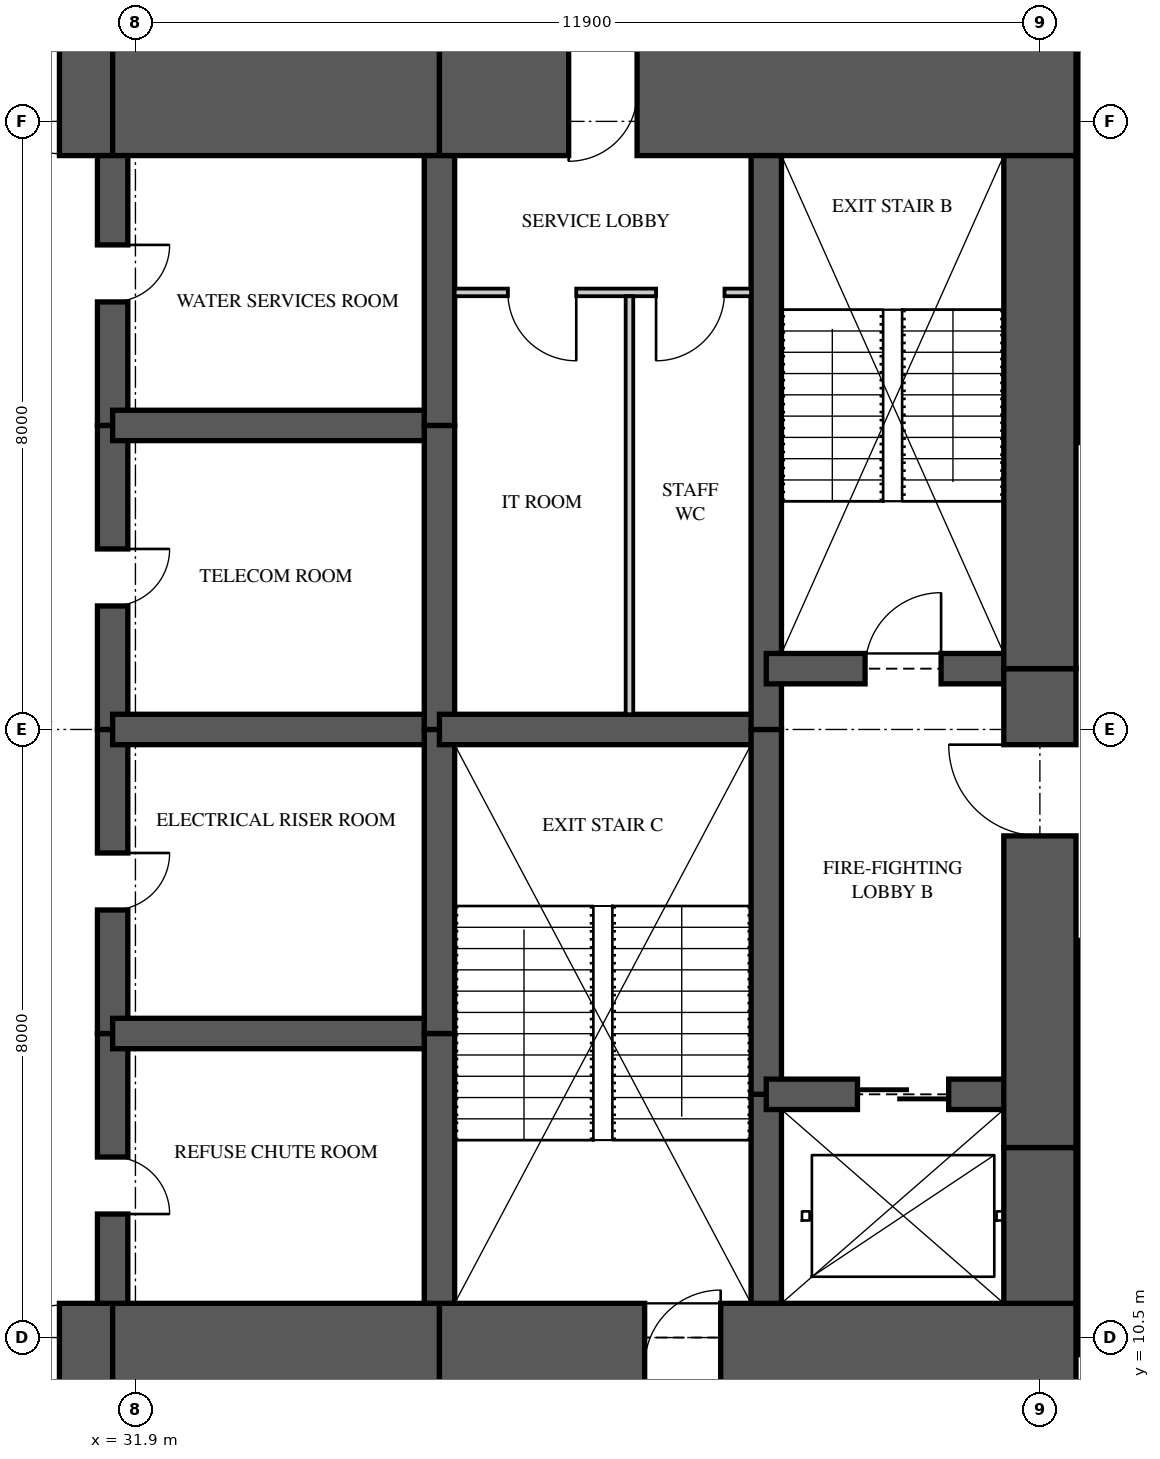
"""IFC4 building model, lengths in metres.
Left out: names, types, materials, properties, quantities, classifications, styles, units other than length and angle.
Written with IfcOpenShell. Run it as: python <this file> out.ifc"""

import sys

from ifc_helpers import new_model, si_unit, direction, frame, frame_2d, origin, place, context, subcontext, project, spatial, rectangle, extrude, element, fill, save


model = new_model("IFC4")
c1 = context("Model", 3, precision=1e-05, world=origin(), true_north=direction((0.0, 1.0)))
c2 = subcontext(c1, "Body", "Model", "MODEL_VIEW")
j1 = project(units=[si_unit("LENGTHUNIT", "METRE"), si_unit("PLANEANGLEUNIT", "RADIAN")], contexts=[c1])
p1 = place(None, origin())
s1 = spatial("IfcSite", under=j1, at=p1, CompositionType="ELEMENT")
p2 = place(p1, origin())
s2 = spatial("IfcBuilding", under=s1, at=p2, CompositionType="ELEMENT")
p3 = place(p2, frame((0.0, 0.0, 34.4)))
s3 = spatial("IfcBuildingStorey", under=s2, at=p3, CompositionType="ELEMENT", Elevation=34.4)
p4 = place(p3, frame((26.0, 10.125, 0.0), z_axis=(0.0, 0.0, 1.0), x_axis=(1.0, 0.0, 0.0)))
e1 = element("IfcWall", 1, at=p4, inside=s3, PredefinedType="SHEAR", context=c2, shape_type="SweptSolid", body=[
    extrude(rectangle(XDim=5.6, YDim=1.65, at=frame_2d((2.8, 0.0))), origin(), (0.0, 0.0, 1.0), 3.35),
])
p5 = place(p4, frame((3.3, 0.0, 0.0)))
e2 = element("IfcOpeningElement", 2, at=p5, cuts=e1, PredefinedType="OPENING", context=c2, shape_type="SweptSolid", body=[
    extrude(rectangle(XDim=1.6, YDim=2.1, at=frame_2d((0.8, 1.05))), frame((0.0, 0.835, 0.0), z_axis=(0.0, -1.0, 0.0), x_axis=(1.0, 0.0, 0.0)), (0.0, 0.0, 1.0), 1.67),
])
p6 = place(p3, frame((31.6, 10.125, 0.0), z_axis=(0.0, 0.0, 1.0), x_axis=(1.0, 0.0, 0.0)))
e3 = element("IfcWall", 3, at=p6, inside=s3, PredefinedType="SHEAR", context=c2, shape_type="SweptSolid", body=[
    extrude(rectangle(XDim=4.3, YDim=1.65, at=frame_2d((2.15, 0.0))), origin(), (0.0, 0.0, 1.0), 3.35),
])
p7 = place(p3, frame((35.9, 10.125, 0.0), z_axis=(0.0, 0.0, 1.0), x_axis=(1.0, 0.0, 0.0)))
e4 = element("IfcWall", 4, at=p7, inside=s3, PredefinedType="SHEAR", context=c2, shape_type="SweptSolid", body=[
    extrude(rectangle(XDim=8.375, YDim=1.65, at=frame_2d((4.188, 0.0))), origin(), (0.0, 0.0, 1.0), 3.35),
])
p8 = place(p7, frame((2.7, 0.0, 0.0)))
e5 = element("IfcOpeningElement", 5, at=p8, cuts=e4, PredefinedType="OPENING", context=c2, shape_type="SweptSolid", body=[
    extrude(rectangle(XDim=1.0, YDim=2.1, at=frame_2d((0.5, 1.05))), frame((0.0, 0.835, 0.0), z_axis=(0.0, -1.0, 0.0), x_axis=(1.0, 0.0, 0.0)), (0.0, 0.0, 1.0), 1.67),
])
p9 = place(p3, frame((44.275, 26.875, 0.0), z_axis=(0.0, 0.0, 1.0), x_axis=(-1.0, 0.0, 0.0)))
e6 = element("IfcWall", 6, at=p9, inside=s3, PredefinedType="SHEAR", context=c2, shape_type="SweptSolid", body=[
    extrude(rectangle(XDim=8.375, YDim=1.65, at=frame_2d((4.188, 0.0))), origin(), (0.0, 0.0, 1.0), 3.35),
])
p10 = place(p9, frame((5.775, 0.0, 0.0)))
e7 = element("IfcOpeningElement", 7, at=p10, cuts=e6, PredefinedType="OPENING", context=c2, shape_type="SweptSolid", body=[
    extrude(rectangle(XDim=0.9, YDim=2.1, at=frame_2d((0.45, 1.05))), frame((0.0, 0.835, 0.0), z_axis=(0.0, -1.0, 0.0), x_axis=(1.0, 0.0, 0.0)), (0.0, 0.0, 1.0), 1.67),
])
p11 = place(p3, frame((35.9, 26.875, 0.0), z_axis=(0.0, 0.0, 1.0), x_axis=(-1.0, 0.0, 0.0)))
e8 = element("IfcWall", 8, at=p11, inside=s3, PredefinedType="SHEAR", context=c2, shape_type="SweptSolid", body=[
    extrude(rectangle(XDim=4.3, YDim=1.65, at=frame_2d((2.15, 0.0))), origin(), (0.0, 0.0, 1.0), 3.35),
])
p12 = place(p3, frame((31.6, 26.875, 0.0), z_axis=(0.0, 0.0, 1.0), x_axis=(-1.0, 0.0, 0.0)))
e9 = element("IfcWall", 9, at=p12, inside=s3, PredefinedType="SHEAR", context=c2, shape_type="SweptSolid", body=[
    extrude(rectangle(XDim=5.6, YDim=1.65, at=frame_2d((2.8, 0.0))), origin(), (0.0, 0.0, 1.0), 3.35),
])
p13 = place(p12, frame((0.7, 0.0, 0.0)))
e10 = element("IfcOpeningElement", 10, at=p13, cuts=e9, PredefinedType="OPENING", context=c2, shape_type="SweptSolid", body=[
    extrude(rectangle(XDim=1.6, YDim=2.1, at=frame_2d((0.8, 1.05))), frame((0.0, 0.835, 0.0), z_axis=(0.0, -1.0, 0.0), x_axis=(1.0, 0.0, 0.0)), (0.0, 0.0, 1.0), 1.67),
])
p14 = place(p3, frame((43.8, 10.95, 0.0), z_axis=(0.0, 0.0, 1.0), x_axis=(0.0, 1.0, 0.0)))
e11 = element("IfcWall", 11, at=p14, inside=s3, PredefinedType="SHEAR", context=c2, shape_type="SweptSolid", body=[
    extrude(rectangle(XDim=2.05, YDim=0.95, at=frame_2d((1.025, 0.0))), origin(), (0.0, 0.0, 1.0), 3.35),
])
p15 = place(p3, frame((43.8, 13.0, 0.0), z_axis=(0.0, 0.0, 1.0), x_axis=(0.0, 1.0, 0.0)))
e12 = element("IfcWall", 12, at=p15, inside=s3, PredefinedType="SHEAR", context=c2, shape_type="SweptSolid", body=[
    extrude(rectangle(XDim=6.3, YDim=0.95, at=frame_2d((3.15, 0.0))), origin(), (0.0, 0.0, 1.0), 3.35),
])
p16 = place(p15, frame((4.1, 0.0, 0.0)))
e13 = element("IfcOpeningElement", 13, at=p16, cuts=e12, PredefinedType="OPENING", context=c2, shape_type="SweptSolid", body=[
    extrude(rectangle(XDim=1.2, YDim=2.2, at=frame_2d((0.6, 1.1))), frame((0.0, 0.485, 0.0), z_axis=(0.0, -1.0, 0.0), x_axis=(1.0, 0.0, 0.0)), (0.0, 0.0, 1.0), 0.97),
])
p17 = place(p3, frame((43.8, 19.3, 0.0), z_axis=(0.0, 0.0, 1.0), x_axis=(0.0, 1.0, 0.0)))
e14 = element("IfcWall", 14, at=p17, inside=s3, PredefinedType="SHEAR", context=c2, shape_type="SweptSolid", body=[
    extrude(rectangle(XDim=6.75, YDim=0.95, at=frame_2d((3.375, 0.0))), origin(), (0.0, 0.0, 1.0), 3.35),
])
p18 = place(p3, frame((31.6, 10.95, 0.0), z_axis=(0.0, 0.0, 1.0), x_axis=(0.0, 1.0, 0.0)))
e15 = element("IfcWall", 15, at=p18, inside=s3, PredefinedType="SHEAR", context=c2, shape_type="SweptSolid", body=[
    extrude(rectangle(XDim=3.55, YDim=0.4, at=frame_2d((1.775, 0.0))), origin(), (0.0, 0.0, 1.0), 3.35),
])
p19 = place(p18, frame((1.175, 0.0, 0.0)))
e16 = element("IfcOpeningElement", 16, at=p19, cuts=e15, PredefinedType="OPENING", context=c2, shape_type="SweptSolid", body=[
    extrude(rectangle(XDim=0.75, YDim=2.1, at=frame_2d((0.375, 1.05))), frame((0.0, 0.21, 0.0), z_axis=(0.0, -1.0, 0.0), x_axis=(1.0, 0.0, 0.0)), (0.0, 0.0, 1.0), 0.42),
])
p20 = place(p3, frame((31.6, 14.5, 0.0), z_axis=(0.0, 0.0, 1.0), x_axis=(0.0, 1.0, 0.0)))
e17 = element("IfcWall", 17, at=p20, inside=s3, PredefinedType="SHEAR", context=c2, shape_type="SweptSolid", body=[
    extrude(rectangle(XDim=4.0, YDim=0.4, at=frame_2d((2.0, 0.0))), origin(), (0.0, 0.0, 1.0), 3.35),
])
p21 = place(p20, frame((1.625, 0.0, 0.0)))
e18 = element("IfcOpeningElement", 18, at=p21, cuts=e17, PredefinedType="OPENING", context=c2, shape_type="SweptSolid", body=[
    extrude(rectangle(XDim=0.75, YDim=2.1, at=frame_2d((0.375, 1.05))), frame((0.0, 0.21, 0.0), z_axis=(0.0, -1.0, 0.0), x_axis=(1.0, 0.0, 0.0)), (0.0, 0.0, 1.0), 0.42),
])
p22 = place(p3, frame((31.6, 18.5, 0.0), z_axis=(0.0, 0.0, 1.0), x_axis=(0.0, 1.0, 0.0)))
e19 = element("IfcWall", 19, at=p22, inside=s3, PredefinedType="SHEAR", context=c2, shape_type="SweptSolid", body=[
    extrude(rectangle(XDim=4.0, YDim=0.4, at=frame_2d((2.0, 0.0))), origin(), (0.0, 0.0, 1.0), 3.35),
])
p23 = place(p22, frame((1.625, 0.0, 0.0)))
e20 = element("IfcOpeningElement", 20, at=p23, cuts=e19, PredefinedType="OPENING", context=c2, shape_type="SweptSolid", body=[
    extrude(rectangle(XDim=0.75, YDim=2.1, at=frame_2d((0.375, 1.05))), frame((0.0, 0.21, 0.0), z_axis=(0.0, -1.0, 0.0), x_axis=(1.0, 0.0, 0.0)), (0.0, 0.0, 1.0), 0.42),
])
p24 = place(p3, frame((31.6, 22.5, 0.0), z_axis=(0.0, 0.0, 1.0), x_axis=(0.0, 1.0, 0.0)))
e21 = element("IfcWall", 21, at=p24, inside=s3, PredefinedType="SHEAR", context=c2, shape_type="SweptSolid", body=[
    extrude(rectangle(XDim=3.55, YDim=0.4, at=frame_2d((1.775, 0.0))), origin(), (0.0, 0.0, 1.0), 3.35),
])
p25 = place(p24, frame((1.625, 0.0, 0.0)))
e22 = element("IfcOpeningElement", 22, at=p25, cuts=e21, PredefinedType="OPENING", context=c2, shape_type="SweptSolid", body=[
    extrude(rectangle(XDim=0.75, YDim=2.1, at=frame_2d((0.375, 1.05))), frame((0.0, 0.21, 0.0), z_axis=(0.0, -1.0, 0.0), x_axis=(1.0, 0.0, 0.0)), (0.0, 0.0, 1.0), 0.42),
])
p26 = place(p3, frame((35.9, 10.95, 0.0), z_axis=(0.0, 0.0, 1.0), x_axis=(0.0, 1.0, 0.0)))
e23 = element("IfcWall", 23, at=p26, inside=s3, PredefinedType="SHEAR", context=c2, shape_type="SweptSolid", body=[
    extrude(rectangle(XDim=3.55, YDim=0.4, at=frame_2d((1.775, 0.0))), origin(), (0.0, 0.0, 1.0), 3.35),
])
for number, where, z_axis, x_axis in (
    (24, (35.9, 14.5, 0.0), (0.0, 0.0, 1.0), (0.0, 1.0, 0.0)),
    (25, (35.9, 18.5, 0.0), (0.0, 0.0, 1.0), (0.0, 1.0, 0.0)),
):
    element("IfcWall", number, at=place(p3, frame(where, z_axis=z_axis, x_axis=x_axis)), inside=s3, PredefinedType="SHEAR", context=c2, shape_type="SweptSolid", body=[
        extrude(rectangle(XDim=4.0, YDim=0.4, at=frame_2d((2.0, 0.0))), origin(), (0.0, 0.0, 1.0), 3.35),
    ])
p27 = place(p3, frame((35.9, 22.5, 0.0), z_axis=(0.0, 0.0, 1.0), x_axis=(0.0, 1.0, 0.0)))
e26 = element("IfcWall", 26, at=p27, inside=s3, PredefinedType="SHEAR", context=c2, shape_type="SweptSolid", body=[
    extrude(rectangle(XDim=3.55, YDim=0.4, at=frame_2d((1.775, 0.0))), origin(), (0.0, 0.0, 1.0), 3.35),
])
p28 = place(p3, frame((40.2, 10.95, 0.0), z_axis=(0.0, 0.0, 1.0), x_axis=(0.0, 1.0, 0.0)))
e27 = element("IfcWall", 27, at=p28, inside=s3, PredefinedType="SHEAR", context=c2, shape_type="SweptSolid", body=[
    extrude(rectangle(XDim=2.75, YDim=0.4, at=frame_2d((1.375, 0.0))), origin(), (0.0, 0.0, 1.0), 3.35),
])
p29 = place(p3, frame((40.2, 13.7, 0.0), z_axis=(0.0, 0.0, 1.0), x_axis=(0.0, 1.0, 0.0)))
e28 = element("IfcWall", 28, at=p29, inside=s3, PredefinedType="SHEAR", context=c2, shape_type="SweptSolid", body=[
    extrude(rectangle(XDim=4.8, YDim=0.4, at=frame_2d((2.4, 0.0))), origin(), (0.0, 0.0, 1.0), 3.35),
])
p30 = place(p3, frame((40.2, 18.5, 0.0), z_axis=(0.0, 0.0, 1.0), x_axis=(0.0, 1.0, 0.0)))
e29 = element("IfcWall", 29, at=p30, inside=s3, PredefinedType="SHEAR", context=c2, shape_type="SweptSolid", body=[
    extrude(rectangle(XDim=7.55, YDim=0.4, at=frame_2d((3.775, 0.0))), origin(), (0.0, 0.0, 1.0), 3.35),
])
for number, where, z_axis, x_axis in (
    (30, (31.6, 14.5, 0.0), (0.0, 0.0, 1.0), (1.0, 0.0, 0.0)),
    (31, (31.6, 18.5, 0.0), (0.0, 0.0, 1.0), (1.0, 0.0, 0.0)),
    (32, (31.6, 22.5, 0.0), (0.0, 0.0, 1.0), (1.0, 0.0, 0.0)),
):
    element("IfcWall", number, at=place(p3, frame(where, z_axis=z_axis, x_axis=x_axis)), inside=s3, PredefinedType="SHEAR", context=c2, shape_type="SweptSolid", body=[
        extrude(rectangle(XDim=4.3, YDim=0.4, at=frame_2d((2.15, 0.0))), origin(), (0.0, 0.0, 1.0), 3.35),
    ])
p31 = place(p3, frame((35.9, 18.5, 0.0), z_axis=(0.0, 0.0, 1.0), x_axis=(1.0, 0.0, 0.0)))
e33 = element("IfcWall", 33, at=p31, inside=s3, PredefinedType="SHEAR", context=c2, shape_type="SweptSolid", body=[
    extrude(rectangle(XDim=4.3, YDim=0.4, at=frame_2d((2.15, 0.0))), origin(), (0.0, 0.0, 1.0), 3.35),
])
p32 = place(p3, frame((40.2, 13.7, 0.0), z_axis=(0.0, 0.0, 1.0), x_axis=(1.0, 0.0, 0.0)))
e34 = element("IfcWall", 34, at=p32, inside=s3, PredefinedType="SHEAR", context=c2, shape_type="SweptSolid", body=[
    extrude(rectangle(XDim=3.6, YDim=0.4, at=frame_2d((1.8, 0.0))), origin(), (0.0, 0.0, 1.0), 3.35),
])
p33 = place(p32, frame((1.2, 0.0, 0.0)))
e35 = element("IfcOpeningElement", 35, at=p33, cuts=e34, PredefinedType="OPENING", context=c2, shape_type="SweptSolid", body=[
    extrude(rectangle(XDim=1.2, YDim=2.1, at=frame_2d((0.6, 1.05))), frame((0.0, 0.21, 0.0), z_axis=(0.0, -1.0, 0.0), x_axis=(1.0, 0.0, 0.0)), (0.0, 0.0, 1.0), 0.42),
])
p34 = place(p3, frame((40.2, 19.3, 0.0), z_axis=(0.0, 0.0, 1.0), x_axis=(1.0, 0.0, 0.0)))
e36 = element("IfcWall", 36, at=p34, inside=s3, PredefinedType="SHEAR", context=c2, shape_type="SweptSolid", body=[
    extrude(rectangle(XDim=3.6, YDim=0.4, at=frame_2d((1.8, 0.0))), origin(), (0.0, 0.0, 1.0), 3.35),
])
p35 = place(p34, frame((1.3, 0.0, 0.0)))
e37 = element("IfcOpeningElement", 37, at=p35, cuts=e36, PredefinedType="OPENING", context=c2, shape_type="SweptSolid", body=[
    extrude(rectangle(XDim=1.0, YDim=2.1, at=frame_2d((0.5, 1.05))), frame((0.0, 0.21, 0.0), z_axis=(0.0, -1.0, 0.0), x_axis=(1.0, 0.0, 0.0)), (0.0, 0.0, 1.0), 0.42),
])
p36 = place(p3, frame((36.1, 24.25, 0.0), z_axis=(0.0, 0.0, 1.0), x_axis=(1.0, 0.0, 0.0)))
e38 = element("IfcWall", 38, at=p36, inside=s3, PredefinedType="PARTITIONING", context=c2, shape_type="SweptSolid", body=[
    extrude(rectangle(XDim=3.9, YDim=0.1, at=frame_2d((1.95, 0.0))), origin(), (0.0, 0.0, 1.0), 3.11),
])
p37 = place(p36, frame((0.7, 0.0, 0.0)))
e39 = element("IfcOpeningElement", 39, at=p37, cuts=e38, PredefinedType="OPENING", context=c2, shape_type="SweptSolid", body=[
    extrude(rectangle(XDim=0.9, YDim=2.1, at=frame_2d((0.45, 1.05))), frame((0.0, 0.06, 0.0), z_axis=(0.0, -1.0, 0.0), x_axis=(1.0, 0.0, 0.0)), (0.0, 0.0, 1.0), 0.12),
])
p38 = place(p36, frame((2.65, 0.0, 0.0)))
e40 = element("IfcOpeningElement", 40, at=p38, cuts=e38, PredefinedType="OPENING", context=c2, shape_type="SweptSolid", body=[
    extrude(rectangle(XDim=0.9, YDim=2.1, at=frame_2d((0.45, 1.05))), frame((0.0, 0.06, 0.0), z_axis=(0.0, -1.0, 0.0), x_axis=(1.0, 0.0, 0.0)), (0.0, 0.0, 1.0), 0.12),
])
p39 = place(p3, frame((38.4, 18.7, 0.0), z_axis=(0.0, 0.0, 1.0), x_axis=(0.0, 1.0, 0.0)))
e41 = element("IfcWall", 41, at=p39, inside=s3, PredefinedType="PARTITIONING", context=c2, shape_type="SweptSolid", body=[
    extrude(rectangle(XDim=5.5, YDim=0.1, at=frame_2d((2.75, 0.0))), origin(), (0.0, 0.0, 1.0), 3.11),
])
p40 = place(p37, frame((0.9, 0.0, 0.0), z_axis=(0.0, 0.0, 1.0), x_axis=(-1.0, 0.0, 0.0)))
e42 = element("IfcDoor", 42, at=p40, inside=s3, OperationType="SINGLE_SWING_LEFT", PredefinedType="DOOR", context=c2, shape_type="SweptSolid", body=[
    extrude(rectangle(XDim=0.9, YDim=2.1, at=frame_2d((0.45, 1.05))), frame((0.0, 0.025, 0.0), z_axis=(0.0, -1.0, 0.0), x_axis=(1.0, 0.0, 0.0)), (0.0, 0.0, 1.0), 0.05),
])
fill(e39, e42)
p41 = place(p38, frame((0.9, 0.0, 0.0), z_axis=(0.0, 0.0, 1.0), x_axis=(-1.0, 0.0, 0.0)))
e43 = element("IfcDoor", 43, at=p41, inside=s3, OperationType="SINGLE_SWING_RIGHT", PredefinedType="DOOR", context=c2, shape_type="SweptSolid", body=[
    extrude(rectangle(XDim=0.9, YDim=2.1, at=frame_2d((0.45, 1.05))), frame((0.0, 0.025, 0.0), z_axis=(0.0, -1.0, 0.0), x_axis=(1.0, 0.0, 0.0)), (0.0, 0.0, 1.0), 0.05),
])
fill(e40, e43)
p42 = place(p35, origin())
e44 = element("IfcDoor", 44, at=p42, inside=s3, OperationType="SINGLE_SWING_RIGHT", PredefinedType="DOOR", context=c2, shape_type="SweptSolid", body=[
    extrude(rectangle(XDim=1.0, YDim=2.1, at=frame_2d((0.5, 1.05))), frame((0.0, 0.025, 0.0), z_axis=(0.0, -1.0, 0.0), x_axis=(1.0, 0.0, 0.0)), (0.0, 0.0, 1.0), 0.05),
])
fill(e37, e44)
p43 = place(p16, origin())
e45 = element("IfcDoor", 45, at=p43, inside=s3, OperationType="SINGLE_SWING_RIGHT", PredefinedType="DOOR", context=c2, shape_type="SweptSolid", body=[
    extrude(rectangle(XDim=1.2, YDim=2.2, at=frame_2d((0.6, 1.1))), frame((0.0, 0.025, 0.0), z_axis=(0.0, -1.0, 0.0), x_axis=(1.0, 0.0, 0.0)), (0.0, 0.0, 1.0), 0.05),
])
fill(e13, e45)
p44 = place(p33, origin())
e46 = element("IfcDoor", 46, at=p44, inside=s3, OperationType="SLIDING_TO_LEFT", PredefinedType="DOOR", context=c2, shape_type="SweptSolid", body=[
    extrude(rectangle(XDim=1.2, YDim=2.1, at=frame_2d((0.6, 1.05))), frame((0.0, 0.025, 0.0), z_axis=(0.0, -1.0, 0.0), x_axis=(1.0, 0.0, 0.0)), (0.0, 0.0, 1.0), 0.05),
])
fill(e35, e46)
p45 = place(p5, origin())
e47 = element("IfcDoor", 47, at=p45, inside=s3, OperationType="DOUBLE_DOOR_SINGLE_SWING", PredefinedType="DOOR", context=c2, shape_type="SweptSolid", body=[
    extrude(rectangle(XDim=1.6, YDim=2.1, at=frame_2d((0.8, 1.05))), frame((0.0, 0.025, 0.0), z_axis=(0.0, -1.0, 0.0), x_axis=(1.0, 0.0, 0.0)), (0.0, 0.0, 1.0), 0.05),
])
fill(e2, e47)
p46 = place(p13, origin())
e48 = element("IfcDoor", 48, at=p46, inside=s3, OperationType="DOUBLE_DOOR_SINGLE_SWING", PredefinedType="DOOR", context=c2, shape_type="SweptSolid", body=[
    extrude(rectangle(XDim=1.6, YDim=2.1, at=frame_2d((0.8, 1.05))), frame((0.0, 0.025, 0.0), z_axis=(0.0, -1.0, 0.0), x_axis=(1.0, 0.0, 0.0)), (0.0, 0.0, 1.0), 0.05),
])
fill(e10, e48)
p47 = place(p19, frame((0.75, 0.0, 0.0), z_axis=(0.0, 0.0, 1.0), x_axis=(-1.0, 0.0, 0.0)))
e49 = element("IfcDoor", 49, at=p47, inside=s3, OperationType="SINGLE_SWING_RIGHT", PredefinedType="DOOR", context=c2, shape_type="SweptSolid", body=[
    extrude(rectangle(XDim=0.75, YDim=2.1, at=frame_2d((0.375, 1.05))), frame((0.0, 0.025, 0.0), z_axis=(0.0, -1.0, 0.0), x_axis=(1.0, 0.0, 0.0)), (0.0, 0.0, 1.0), 0.05),
])
fill(e16, e49)
p48 = place(p21, frame((0.75, 0.0, 0.0), z_axis=(0.0, 0.0, 1.0), x_axis=(-1.0, 0.0, 0.0)))
e50 = element("IfcDoor", 50, at=p48, inside=s3, OperationType="SINGLE_SWING_LEFT", PredefinedType="DOOR", context=c2, shape_type="SweptSolid", body=[
    extrude(rectangle(XDim=0.75, YDim=2.1, at=frame_2d((0.375, 1.05))), frame((0.0, 0.025, 0.0), z_axis=(0.0, -1.0, 0.0), x_axis=(1.0, 0.0, 0.0)), (0.0, 0.0, 1.0), 0.05),
])
fill(e18, e50)
p49 = place(p23, frame((0.75, 0.0, 0.0), z_axis=(0.0, 0.0, 1.0), x_axis=(-1.0, 0.0, 0.0)))
e51 = element("IfcDoor", 51, at=p49, inside=s3, OperationType="SINGLE_SWING_LEFT", PredefinedType="DOOR", context=c2, shape_type="SweptSolid", body=[
    extrude(rectangle(XDim=0.75, YDim=2.1, at=frame_2d((0.375, 1.05))), frame((0.0, 0.025, 0.0), z_axis=(0.0, -1.0, 0.0), x_axis=(1.0, 0.0, 0.0)), (0.0, 0.0, 1.0), 0.05),
])
fill(e20, e51)
p50 = place(p25, frame((0.75, 0.0, 0.0), z_axis=(0.0, 0.0, 1.0), x_axis=(-1.0, 0.0, 0.0)))
e52 = element("IfcDoor", 52, at=p50, inside=s3, OperationType="SINGLE_SWING_LEFT", PredefinedType="DOOR", context=c2, shape_type="SweptSolid", body=[
    extrude(rectangle(XDim=0.75, YDim=2.1, at=frame_2d((0.375, 1.05))), frame((0.0, 0.025, 0.0), z_axis=(0.0, -1.0, 0.0), x_axis=(1.0, 0.0, 0.0)), (0.0, 0.0, 1.0), 0.05),
])
fill(e22, e52)
p51 = place(p8, origin())
e53 = element("IfcDoor", 53, at=p51, inside=s3, OperationType="SINGLE_SWING_RIGHT", PredefinedType="DOOR", context=c2, shape_type="SweptSolid", body=[
    extrude(rectangle(XDim=1.0, YDim=2.1, at=frame_2d((0.5, 1.05))), frame((0.0, 0.025, 0.0), z_axis=(0.0, -1.0, 0.0), x_axis=(1.0, 0.0, 0.0)), (0.0, 0.0, 1.0), 0.05),
])
fill(e5, e53)
p52 = place(p10, origin())
e54 = element("IfcDoor", 54, at=p52, inside=s3, OperationType="SINGLE_SWING_RIGHT", PredefinedType="DOOR", context=c2, shape_type="SweptSolid", body=[
    extrude(rectangle(XDim=0.9, YDim=2.1, at=frame_2d((0.45, 1.05))), frame((0.0, 0.47, 0.0), z_axis=(0.0, -1.0, 0.0), x_axis=(1.0, 0.0, 0.0)), (0.0, 0.0, 1.0), 0.8),
])
fill(e7, e54)
save(model, sys.argv[1])
